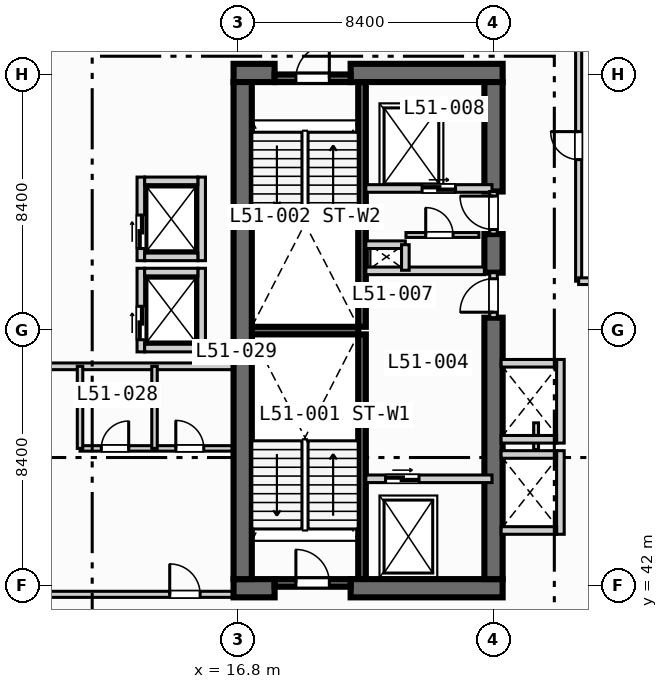
"""IFC4 building model, lengths in metres.
Left out: names, types, materials, properties, quantities, classifications, styles, units other than length and angle.
Written with IfcOpenShell. Run it as: python <this file> out.ifc"""

import sys

from ifc_helpers import new_model, si_unit, direction, frame, frame_2d, origin, place, context, subcontext, project, spatial, rectangle, extrude, element, fill, save


model = new_model("IFC4")
c1 = context("Model", 3, precision=1e-05, world=origin(), true_north=direction((0.0, 1.0)))
c2 = subcontext(c1, "Body", "Model", "MODEL_VIEW")
j1 = project(units=[si_unit("LENGTHUNIT", "METRE"), si_unit("PLANEANGLEUNIT", "RADIAN")], contexts=[c1])
p1 = place(None, origin())
s1 = spatial("IfcSite", under=j1, at=p1, CompositionType="ELEMENT")
p2 = place(p1, origin())
s2 = spatial("IfcBuilding", under=s1, at=p2, CompositionType="ELEMENT")
p3 = place(p2, frame((0.0, 0.0, 208.7)))
s3 = spatial("IfcBuildingStorey", under=s2, at=p3, CompositionType="ELEMENT", Elevation=208.7)
for number, where, z_axis, x_axis in (
    (1, (20.875, 42.2, 0.0), (0.0, 0.0, 1.0), (0.0, 1.0, 0.0)),
    (2, (20.875, 50.5, 0.0), (0.0, 0.0, 1.0), (0.0, 1.0, 0.0)),
):
    element("IfcWall", number, at=place(p3, frame(where, z_axis=z_axis, x_axis=x_axis)), inside=s3, PredefinedType="SOLIDWALL", context=c2, shape_type="SweptSolid", body=[
        extrude(rectangle(XDim=8.05, YDim=0.25, at=frame_2d((4.025, 0.0))), origin(), (0.0, 0.0, 1.0), 3.47),
    ])
p4 = place(p3, frame((17.25, 50.375, 0.0), z_axis=(0.0, 0.0, 1.0), x_axis=(1.0, 0.0, 0.0)))
e3 = element("IfcWall", 3, at=p4, inside=s3, PredefinedType="SOLIDWALL", context=c2, shape_type="SweptSolid", body=[
    extrude(rectangle(XDim=3.5, YDim=0.25, at=frame_2d((1.75, 0.0))), origin(), (0.0, 0.0, 1.0), 3.47),
])
p5 = place(p3, frame((16.65, 41.9, 0.0), z_axis=(0.0, 0.0, 1.0), x_axis=(1.0, 0.0, 0.0)))
e4 = element("IfcWall", 4, at=p5, inside=s3, PredefinedType="SHEAR", context=c2, shape_type="SweptSolid", body=[
    extrude(rectangle(XDim=1.35, YDim=0.6, at=frame_2d((0.675, 0.0))), origin(), (0.0, 0.0, 1.0), 3.47),
])
p6 = place(p3, frame((20.5, 41.9, 0.0), z_axis=(0.0, 0.0, 1.0), x_axis=(1.0, 0.0, 0.0)))
e5 = element("IfcWall", 5, at=p6, inside=s3, PredefinedType="SHEAR", context=c2, shape_type="SweptSolid", body=[
    extrude(rectangle(XDim=5.0, YDim=0.6, at=frame_2d((2.5, 0.0))), origin(), (0.0, 0.0, 1.0), 3.47),
])
p7 = place(p3, frame((16.65, 58.85, 0.0), z_axis=(0.0, 0.0, 1.0), x_axis=(1.0, 0.0, 0.0)))
e6 = element("IfcWall", 6, at=p7, inside=s3, PredefinedType="SHEAR", context=c2, shape_type="SweptSolid", body=[
    extrude(rectangle(XDim=1.35, YDim=0.6, at=frame_2d((0.675, 0.0))), origin(), (0.0, 0.0, 1.0), 3.47),
])
p8 = place(p3, frame((20.5, 58.85, 0.0), z_axis=(0.0, 0.0, 1.0), x_axis=(1.0, 0.0, 0.0)))
e7 = element("IfcWall", 7, at=p8, inside=s3, PredefinedType="SHEAR", context=c2, shape_type="SweptSolid", body=[
    extrude(rectangle(XDim=5.0, YDim=0.6, at=frame_2d((2.5, 0.0))), origin(), (0.0, 0.0, 1.0), 3.47),
])
p9 = place(p3, frame((16.95, 42.2, 0.0), z_axis=(0.0, 0.0, 1.0), x_axis=(0.0, 1.0, 0.0)))
e8 = element("IfcWall", 8, at=p9, inside=s3, PredefinedType="SHEAR", context=c2, shape_type="SweptSolid", body=[
    extrude(rectangle(XDim=16.35, YDim=0.6, at=frame_2d((8.175, 0.0))), origin(), (0.0, 0.0, 1.0), 3.47),
])
p10 = place(p3, frame((25.2, 42.2, 0.0), z_axis=(0.0, 0.0, 1.0), x_axis=(0.0, 1.0, 0.0)))
e9 = element("IfcWall", 9, at=p10, inside=s3, PredefinedType="SHEAR", context=c2, shape_type="SweptSolid", body=[
    extrude(rectangle(XDim=8.6, YDim=0.6, at=frame_2d((4.3, 0.0))), origin(), (0.0, 0.0, 1.0), 3.47),
])
p11 = place(p3, frame((25.2, 52.28, 0.0), z_axis=(0.0, 0.0, 1.0), x_axis=(0.0, 1.0, 0.0)))
e10 = element("IfcWall", 10, at=p11, inside=s3, PredefinedType="SHEAR", context=c2, shape_type="SweptSolid", body=[
    extrude(rectangle(XDim=1.27, YDim=0.6, at=frame_2d((0.635, 0.0))), origin(), (0.0, 0.0, 1.0), 3.47),
])
p12 = place(p3, frame((25.2, 54.95, 0.0), z_axis=(0.0, 0.0, 1.0), x_axis=(0.0, 1.0, 0.0)))
e11 = element("IfcWall", 11, at=p12, inside=s3, PredefinedType="SHEAR", context=c2, shape_type="SweptSolid", body=[
    extrude(rectangle(XDim=3.6, YDim=0.6, at=frame_2d((1.8, 0.0))), origin(), (0.0, 0.0, 1.0), 3.47),
])
p13 = place(p3, frame((18.0, 42.075, 0.0), z_axis=(0.0, 0.0, 1.0), x_axis=(1.0, 0.0, 0.0)))
e12 = element("IfcWall", 12, at=p13, inside=s3, PredefinedType="SOLIDWALL", context=c2, shape_type="SweptSolid", body=[
    extrude(rectangle(XDim=2.5, YDim=0.25, at=frame_2d((1.25, 0.0))), origin(), (0.0, 0.0, 1.0), 3.47),
])
p14 = place(p13, frame((0.7, 0.0, 0.0)))
e13 = element("IfcOpeningElement", 13, at=p14, cuts=e12, PredefinedType="OPENING", context=c2, shape_type="SweptSolid", body=[
    extrude(rectangle(XDim=1.1, YDim=2.15, at=frame_2d((0.55, 1.075))), frame((0.0, 0.135, 0.0), z_axis=(0.0, -1.0, 0.0), x_axis=(1.0, 0.0, 0.0)), (0.0, 0.0, 1.0), 0.27),
])
p15 = place(p3, frame((18.0, 58.675, 0.0), z_axis=(0.0, 0.0, 1.0), x_axis=(1.0, 0.0, 0.0)))
e14 = element("IfcWall", 14, at=p15, inside=s3, PredefinedType="SOLIDWALL", context=c2, shape_type="SweptSolid", body=[
    extrude(rectangle(XDim=2.5, YDim=0.25, at=frame_2d((1.25, 0.0))), origin(), (0.0, 0.0, 1.0), 3.47),
])
p16 = place(p15, frame((0.7, 0.0, 0.0)))
e15 = element("IfcOpeningElement", 15, at=p16, cuts=e14, PredefinedType="OPENING", context=c2, shape_type="SweptSolid", body=[
    extrude(rectangle(XDim=1.1, YDim=2.15, at=frame_2d((0.55, 1.075))), frame((0.0, 0.135, 0.0), z_axis=(0.0, -1.0, 0.0), x_axis=(1.0, 0.0, 0.0)), (0.0, 0.0, 1.0), 0.27),
])
p17 = place(p3, frame((21.0, 45.5, 0.0), z_axis=(0.0, 0.0, 1.0), x_axis=(1.0, 0.0, 0.0)))
e16 = element("IfcWall", 16, at=p17, inside=s3, PredefinedType="SOLIDWALL", context=c2, shape_type="SweptSolid", body=[
    extrude(rectangle(XDim=4.15, YDim=0.25, at=frame_2d((2.075, 0.0))), origin(), (0.0, 0.0, 1.0), 3.47),
])
p18 = place(p17, frame((0.65, 0.0, 0.0)))
e17 = element("IfcOpeningElement", 17, at=p18, cuts=e16, PredefinedType="OPENING", context=c2, shape_type="SweptSolid", body=[
    extrude(rectangle(XDim=1.1, YDim=2.15, at=frame_2d((0.55, 1.075))), frame((0.0, 0.135, 0.0), z_axis=(0.0, -1.0, 0.0), x_axis=(1.0, 0.0, 0.0)), (0.0, 0.0, 1.0), 0.27),
])
p19 = place(p3, frame((25.2, 50.8, 0.0), z_axis=(0.0, 0.0, 1.0), x_axis=(0.0, 1.0, 0.0)))
e18 = element("IfcWall", 18, at=p19, inside=s3, PredefinedType="SOLIDWALL", context=c2, shape_type="SweptSolid", body=[
    extrude(rectangle(XDim=1.48, YDim=0.25, at=frame_2d((0.74, 0.0))), origin(), (0.0, 0.0, 1.0), 3.47),
])
p20 = place(p19, frame((0.18, 0.0, 0.0)))
e19 = element("IfcOpeningElement", 19, at=p20, cuts=e18, PredefinedType="OPENING", context=c2, shape_type="SweptSolid", body=[
    extrude(rectangle(XDim=1.1, YDim=2.15, at=frame_2d((0.55, 1.075))), frame((0.0, 0.135, 0.0), z_axis=(0.0, -1.0, 0.0), x_axis=(1.0, 0.0, 0.0)), (0.0, 0.0, 1.0), 0.27),
])
p21 = place(p3, frame((21.0, 52.34, 0.0), z_axis=(0.0, 0.0, 1.0), x_axis=(1.0, 0.0, 0.0)))
e20 = element("IfcWall", 20, at=p21, inside=s3, PredefinedType="SOLIDWALL", context=c2, shape_type="SweptSolid", body=[
    extrude(rectangle(XDim=3.9, YDim=0.25, at=frame_2d((1.95, 0.0))), origin(), (0.0, 0.0, 1.0), 3.47),
])
p22 = place(p3, frame((21.0, 55.05, 0.0), z_axis=(0.0, 0.0, 1.0), x_axis=(1.0, 0.0, 0.0)))
e21 = element("IfcWall", 21, at=p22, inside=s3, PredefinedType="SOLIDWALL", context=c2, shape_type="SweptSolid", body=[
    extrude(rectangle(XDim=4.15, YDim=0.25, at=frame_2d((2.075, 0.0))), origin(), (0.0, 0.0, 1.0), 3.47),
])
p23 = place(p22, frame((1.85, 0.0, 0.0)))
e22 = element("IfcOpeningElement", 22, at=p23, cuts=e21, PredefinedType="OPENING", context=c2, shape_type="SweptSolid", body=[
    extrude(rectangle(XDim=1.1, YDim=2.15, at=frame_2d((0.55, 1.075))), frame((0.0, 0.135, 0.0), z_axis=(0.0, -1.0, 0.0), x_axis=(1.0, 0.0, 0.0)), (0.0, 0.0, 1.0), 0.27),
])
p24 = place(p3, frame((25.2, 53.55, 0.0), z_axis=(0.0, 0.0, 1.0), x_axis=(0.0, 1.0, 0.0)))
e23 = element("IfcWall", 23, at=p24, inside=s3, PredefinedType="SOLIDWALL", context=c2, shape_type="SweptSolid", body=[
    extrude(rectangle(XDim=1.4, YDim=0.25, at=frame_2d((0.7, 0.0))), origin(), (0.0, 0.0, 1.0), 3.47),
])
p25 = place(p24, frame((0.15, 0.0, 0.0)))
e24 = element("IfcOpeningElement", 24, at=p25, cuts=e23, PredefinedType="OPENING", context=c2, shape_type="SweptSolid", body=[
    extrude(rectangle(XDim=1.1, YDim=2.15, at=frame_2d((0.55, 1.075))), frame((0.0, 0.135, 0.0), z_axis=(0.0, -1.0, 0.0), x_axis=(1.0, 0.0, 0.0)), (0.0, 0.0, 1.0), 0.27),
])
p26 = place(p3, frame((21.0, 53.2, 0.0), z_axis=(0.0, 0.0, 1.0), x_axis=(1.0, 0.0, 0.0)))
e25 = element("IfcWall", 25, at=p26, inside=s3, PredefinedType="SOLIDWALL", context=c2, shape_type="SweptSolid", body=[
    extrude(rectangle(XDim=1.3, YDim=0.25, at=frame_2d((0.65, 0.0))), origin(), (0.0, 0.0, 1.0), 3.47),
])
p27 = place(p3, frame((22.3, 52.36, 0.0), z_axis=(0.0, 0.0, 1.0), x_axis=(0.0, 1.0, 0.0)))
e26 = element("IfcWall", 26, at=p27, inside=s3, PredefinedType="SOLIDWALL", context=c2, shape_type="SweptSolid", body=[
    extrude(rectangle(XDim=0.84, YDim=0.25, at=frame_2d((0.42, 0.0))), origin(), (0.0, 0.0, 1.0), 3.47),
])
p28 = place(p3, frame((22.32, 53.52, 0.0), z_axis=(0.0, 0.0, 1.0), x_axis=(1.0, 0.0, 0.0)))
e27 = element("IfcWall", 27, at=p28, inside=s3, PredefinedType="PARTITIONING", context=c2, shape_type="SweptSolid", body=[
    extrude(rectangle(XDim=2.4, YDim=0.16, at=frame_2d((1.2, 0.0))), origin(), (0.0, 0.0, 1.0), 3.47),
])
p29 = place(p28, frame((0.65, 0.0, 0.0)))
e28 = element("IfcOpeningElement", 28, at=p29, cuts=e27, PredefinedType="OPENING", context=c2, shape_type="SweptSolid", body=[
    extrude(rectangle(XDim=0.9, YDim=2.1, at=frame_2d((0.45, 1.05))), frame((0.0, 0.09, 0.0), z_axis=(0.0, -1.0, 0.0), x_axis=(1.0, 0.0, 0.0)), (0.0, 0.0, 1.0), 0.18),
])
p30 = place(p3, frame((13.6, 49.675, 0.0), z_axis=(0.0, 0.0, 1.0), x_axis=(0.0, 1.0, 0.0)))
e29 = element("IfcWall", 29, at=p30, inside=s3, PredefinedType="SOLIDWALL", context=c2, shape_type="SweptSolid", body=[
    extrude(rectangle(XDim=2.75, YDim=0.25, at=frame_2d((1.375, 0.0))), origin(), (0.0, 0.0, 1.0), 3.47),
])
p31 = place(p30, frame((0.4, 0.0, 0.0)))
e30 = element("IfcOpeningElement", 30, at=p31, cuts=e29, PredefinedType="OPENING", context=c2, shape_type="SweptSolid", body=[
    extrude(rectangle(XDim=1.1, YDim=2.15, at=frame_2d((0.55, 1.075))), frame((0.0, 0.135, 0.0), z_axis=(0.0, -1.0, 0.0), x_axis=(1.0, 0.0, 0.0)), (0.0, 0.0, 1.0), 0.27),
])
p32 = place(p3, frame((15.6, 49.675, 0.0), z_axis=(0.0, 0.0, 1.0), x_axis=(0.0, 1.0, 0.0)))
e31 = element("IfcWall", 31, at=p32, inside=s3, PredefinedType="SOLIDWALL", context=c2, shape_type="SweptSolid", body=[
    extrude(rectangle(XDim=2.75, YDim=0.25, at=frame_2d((1.375, 0.0))), origin(), (0.0, 0.0, 1.0), 3.47),
])
for number, where, z_axis, x_axis in (
    (32, (13.725, 49.8, 0.0), (0.0, 0.0, 1.0), (1.0, 0.0, 0.0)),
    (33, (13.725, 52.3, 0.0), (0.0, 0.0, 1.0), (1.0, 0.0, 0.0)),
):
    element("IfcWall", number, at=place(p3, frame(where, z_axis=z_axis, x_axis=x_axis)), inside=s3, PredefinedType="SOLIDWALL", context=c2, shape_type="SweptSolid", body=[
        extrude(rectangle(XDim=1.75, YDim=0.25, at=frame_2d((0.875, 0.0))), origin(), (0.0, 0.0, 1.0), 3.47),
    ])
p33 = place(p3, frame((13.6, 52.675, 0.0), z_axis=(0.0, 0.0, 1.0), x_axis=(0.0, 1.0, 0.0)))
e34 = element("IfcWall", 34, at=p33, inside=s3, PredefinedType="SOLIDWALL", context=c2, shape_type="SweptSolid", body=[
    extrude(rectangle(XDim=2.75, YDim=0.25, at=frame_2d((1.375, 0.0))), origin(), (0.0, 0.0, 1.0), 3.47),
])
p34 = place(p33, frame((0.4, 0.0, 0.0)))
e35 = element("IfcOpeningElement", 35, at=p34, cuts=e34, PredefinedType="OPENING", context=c2, shape_type="SweptSolid", body=[
    extrude(rectangle(XDim=1.1, YDim=2.15, at=frame_2d((0.55, 1.075))), frame((0.0, 0.135, 0.0), z_axis=(0.0, -1.0, 0.0), x_axis=(1.0, 0.0, 0.0)), (0.0, 0.0, 1.0), 0.27),
])
p35 = place(p3, frame((15.6, 52.675, 0.0), z_axis=(0.0, 0.0, 1.0), x_axis=(0.0, 1.0, 0.0)))
e36 = element("IfcWall", 36, at=p35, inside=s3, PredefinedType="SOLIDWALL", context=c2, shape_type="SweptSolid", body=[
    extrude(rectangle(XDim=2.75, YDim=0.25, at=frame_2d((1.375, 0.0))), origin(), (0.0, 0.0, 1.0), 3.47),
])
for number, where, z_axis, x_axis in (
    (37, (13.725, 52.8, 0.0), (0.0, 0.0, 1.0), (1.0, 0.0, 0.0)),
    (38, (13.725, 55.3, 0.0), (0.0, 0.0, 1.0), (1.0, 0.0, 0.0)),
):
    element("IfcWall", number, at=place(p3, frame(where, z_axis=z_axis, x_axis=x_axis)), inside=s3, PredefinedType="SOLIDWALL", context=c2, shape_type="SweptSolid", body=[
        extrude(rectangle(XDim=1.75, YDim=0.25, at=frame_2d((0.875, 0.0))), origin(), (0.0, 0.0, 1.0), 3.47),
    ])
p36 = place(p3, frame((27.4, 43.675, 0.0), z_axis=(0.0, 0.0, 1.0), x_axis=(0.0, 1.0, 0.0)))
e39 = element("IfcWall", 39, at=p36, inside=s3, PredefinedType="SOLIDWALL", context=c2, shape_type="SweptSolid", body=[
    extrude(rectangle(XDim=2.75, YDim=0.25, at=frame_2d((1.375, 0.0))), origin(), (0.0, 0.0, 1.0), 3.47),
])
for number, where, z_axis, x_axis in (
    (40, (25.45, 43.8, 0.0), (0.0, 0.0, 1.0), (1.0, 0.0, 0.0)),
    (41, (25.45, 46.3, 0.0), (0.0, 0.0, 1.0), (1.0, 0.0, 0.0)),
):
    element("IfcWall", number, at=place(p3, frame(where, z_axis=z_axis, x_axis=x_axis)), inside=s3, PredefinedType="SOLIDWALL", context=c2, shape_type="SweptSolid", body=[
        extrude(rectangle(XDim=1.825, YDim=0.25, at=frame_2d((0.913, 0.0))), origin(), (0.0, 0.0, 1.0), 3.47),
    ])
p37 = place(p3, frame((26.6, 46.46, 0.0), z_axis=(0.0, 0.0, 1.0), x_axis=(0.0, 1.0, 0.0)))
e42 = element("IfcWall", 42, at=p37, inside=s3, PredefinedType="PARTITIONING", context=c2, shape_type="SweptSolid", body=[
    extrude(rectangle(XDim=0.88, YDim=0.16, at=frame_2d((0.44, 0.0))), origin(), (0.0, 0.0, 1.0), 3.47),
])
p38 = place(p3, frame((27.4, 46.675, 0.0), z_axis=(0.0, 0.0, 1.0), x_axis=(0.0, 1.0, 0.0)))
e43 = element("IfcWall", 43, at=p38, inside=s3, PredefinedType="SOLIDWALL", context=c2, shape_type="SweptSolid", body=[
    extrude(rectangle(XDim=2.75, YDim=0.25, at=frame_2d((1.375, 0.0))), origin(), (0.0, 0.0, 1.0), 3.47),
])
for number, where, z_axis, x_axis in (
    (44, (25.45, 46.8, 0.0), (0.0, 0.0, 1.0), (1.0, 0.0, 0.0)),
    (45, (25.45, 49.3, 0.0), (0.0, 0.0, 1.0), (1.0, 0.0, 0.0)),
):
    element("IfcWall", number, at=place(p3, frame(where, z_axis=z_axis, x_axis=x_axis)), inside=s3, PredefinedType="SOLIDWALL", context=c2, shape_type="SweptSolid", body=[
        extrude(rectangle(XDim=1.825, YDim=0.25, at=frame_2d((0.913, 0.0))), origin(), (0.0, 0.0, 1.0), 3.47),
    ])
p39 = place(p3, frame((0.35, 41.7, 0.0), z_axis=(0.0, 0.0, 1.0), x_axis=(1.0, 0.0, 0.0)))
e46 = element("IfcWall", 46, at=p39, inside=s3, PredefinedType="PARTITIONING", context=c2, shape_type="SweptSolid", body=[
    extrude(rectangle(XDim=16.25, YDim=0.2, at=frame_2d((8.125, 0.0))), origin(), (0.0, 0.0, 1.0), 2.82),
])
p40 = place(p39, frame((14.2, 0.0, 0.0)))
e47 = element("IfcOpeningElement", 47, at=p40, cuts=e46, PredefinedType="OPENING", context=c2, shape_type="SweptSolid", body=[
    extrude(rectangle(XDim=1.0, YDim=2.15, at=frame_2d((0.5, 1.075))), frame((0.0, 0.11, 0.0), z_axis=(0.0, -1.0, 0.0), x_axis=(1.0, 0.0, 0.0)), (0.0, 0.0, 1.0), 0.22),
])
p41 = place(p3, frame((0.35, 49.2, 0.0), z_axis=(0.0, 0.0, 1.0), x_axis=(1.0, 0.0, 0.0)))
e48 = element("IfcWall", 48, at=p41, inside=s3, PredefinedType="PARTITIONING", context=c2, shape_type="SweptSolid", body=[
    extrude(rectangle(XDim=16.25, YDim=0.22, at=frame_2d((8.125, 0.0))), origin(), (0.0, 0.0, 1.0), 3.47),
])
p42 = place(p3, frame((11.6, 46.5, 0.0), z_axis=(0.0, 0.0, 1.0), x_axis=(1.0, 0.0, 0.0)))
e49 = element("IfcWall", 49, at=p42, inside=s3, PredefinedType="PLUMBINGWALL", context=c2, shape_type="SweptSolid", body=[
    extrude(rectangle(XDim=5.0, YDim=0.18, at=frame_2d((2.5, 0.0))), origin(), (0.0, 0.0, 1.0), 3.47),
])
p43 = place(p42, frame((0.7, 0.0, 0.0)))
e50 = element("IfcOpeningElement", 50, at=p43, cuts=e49, PredefinedType="OPENING", context=c2, shape_type="SweptSolid", body=[
    extrude(rectangle(XDim=0.9, YDim=2.1, at=frame_2d((0.45, 1.05))), frame((0.0, 0.1, 0.0), z_axis=(0.0, -1.0, 0.0), x_axis=(1.0, 0.0, 0.0)), (0.0, 0.0, 1.0), 0.2),
])
p44 = place(p42, frame((3.15, 0.0, 0.0)))
e51 = element("IfcOpeningElement", 51, at=p44, cuts=e49, PredefinedType="OPENING", context=c2, shape_type="SweptSolid", body=[
    extrude(rectangle(XDim=0.92, YDim=2.1, at=frame_2d((0.46, 1.05))), frame((0.0, 0.1, 0.0), z_axis=(0.0, -1.0, 0.0), x_axis=(1.0, 0.0, 0.0)), (0.0, 0.0, 1.0), 0.2),
])
for number, where, z_axis, x_axis in (
    (52, (11.6, 46.5, 0.0), (0.0, 0.0, 1.0), (0.0, 1.0, 0.0)),
    (53, (14.05, 46.5, 0.0), (0.0, 0.0, 1.0), (0.0, 1.0, 0.0)),
):
    element("IfcWall", number, at=place(p3, frame(where, z_axis=z_axis, x_axis=x_axis)), inside=s3, PredefinedType="PLUMBINGWALL", context=c2, shape_type="SweptSolid", body=[
        extrude(rectangle(XDim=2.7, YDim=0.18, at=frame_2d((1.35, 0.0))), origin(), (0.0, 0.0, 1.0), 3.47),
    ])
p45 = place(p3, frame((28.0, 52.0, 0.0), z_axis=(0.0, 0.0, 1.0), x_axis=(0.0, 1.0, 0.0)))
e54 = element("IfcWall", 54, at=p45, inside=s3, PredefinedType="PARTITIONING", context=c2, shape_type="SweptSolid", body=[
    extrude(rectangle(XDim=20.2, YDim=0.2, at=frame_2d((10.1, 0.0))), origin(), (0.0, 0.0, 1.0), 3.47),
])
p46 = place(p45, frame((4.0, 0.0, 0.0)))
e55 = element("IfcOpeningElement", 55, at=p46, cuts=e54, PredefinedType="OPENING", context=c2, shape_type="SweptSolid", body=[
    extrude(rectangle(XDim=0.92, YDim=2.1, at=frame_2d((0.46, 1.05))), frame((0.0, 0.11, 0.0), z_axis=(0.0, -1.0, 0.0), x_axis=(1.0, 0.0, 0.0)), (0.0, 0.0, 1.0), 0.22),
])
p47 = place(p3, frame((28.0, 52.0, 0.0), z_axis=(0.0, 0.0, 1.0), x_axis=(1.0, 0.0, 0.0)))
e56 = element("IfcWall", 56, at=p47, inside=s3, PredefinedType="PARTITIONING", context=c2, shape_type="SweptSolid", body=[
    extrude(rectangle(XDim=5.3, YDim=0.22, at=frame_2d((2.65, 0.0))), origin(), (0.0, 0.0, 1.0), 3.47),
])
p48 = place(p14, origin())
e57 = element("IfcDoor", 57, at=p48, inside=s3, OperationType="SINGLE_SWING_LEFT", PredefinedType="DOOR", context=c2, shape_type="SweptSolid", body=[
    extrude(rectangle(XDim=1.1, YDim=2.15, at=frame_2d((0.55, 1.075))), frame((0.0, 0.025, 0.0), z_axis=(0.0, -1.0, 0.0), x_axis=(1.0, 0.0, 0.0)), (0.0, 0.0, 1.0), 0.05),
])
fill(e13, e57)
p49 = place(p16, origin())
e58 = element("IfcDoor", 58, at=p49, inside=s3, OperationType="SINGLE_SWING_RIGHT", PredefinedType="DOOR", context=c2, shape_type="SweptSolid", body=[
    extrude(rectangle(XDim=1.1, YDim=2.15, at=frame_2d((0.55, 1.075))), frame((0.0, 0.025, 0.0), z_axis=(0.0, -1.0, 0.0), x_axis=(1.0, 0.0, 0.0)), (0.0, 0.0, 1.0), 0.05),
])
fill(e15, e58)
p50 = place(p18, origin())
e59 = element("IfcDoor", 59, at=p50, inside=s3, OperationType="SLIDING_TO_LEFT", PredefinedType="DOOR", context=c2, shape_type="SweptSolid", body=[
    extrude(rectangle(XDim=1.1, YDim=2.15, at=frame_2d((0.55, 1.075))), frame((0.0, 0.025, 0.0), z_axis=(0.0, -1.0, 0.0), x_axis=(1.0, 0.0, 0.0)), (0.0, 0.0, 1.0), 0.05),
])
fill(e17, e59)
p51 = place(p20, origin())
e60 = element("IfcDoor", 60, at=p51, inside=s3, OperationType="SINGLE_SWING_LEFT", PredefinedType="DOOR", context=c2, shape_type="SweptSolid", body=[
    extrude(rectangle(XDim=1.1, YDim=2.15, at=frame_2d((0.55, 1.075))), frame((0.0, 0.025, 0.0), z_axis=(0.0, -1.0, 0.0), x_axis=(1.0, 0.0, 0.0)), (0.0, 0.0, 1.0), 0.05),
])
fill(e19, e60)
p52 = place(p23, origin())
e61 = element("IfcDoor", 61, at=p52, inside=s3, OperationType="SLIDING_TO_LEFT", PredefinedType="DOOR", context=c2, shape_type="SweptSolid", body=[
    extrude(rectangle(XDim=1.1, YDim=2.15, at=frame_2d((0.55, 1.075))), frame((0.0, 0.025, 0.0), z_axis=(0.0, -1.0, 0.0), x_axis=(1.0, 0.0, 0.0)), (0.0, 0.0, 1.0), 0.05),
])
fill(e22, e61)
p53 = place(p25, origin())
e62 = element("IfcDoor", 62, at=p53, inside=s3, OperationType="SINGLE_SWING_RIGHT", PredefinedType="DOOR", context=c2, shape_type="SweptSolid", body=[
    extrude(rectangle(XDim=1.1, YDim=2.15, at=frame_2d((0.55, 1.075))), frame((0.0, 0.025, 0.0), z_axis=(0.0, -1.0, 0.0), x_axis=(1.0, 0.0, 0.0)), (0.0, 0.0, 1.0), 0.05),
])
fill(e24, e62)
p54 = place(p29, origin())
e63 = element("IfcDoor", 63, at=p54, inside=s3, OperationType="SINGLE_SWING_LEFT", PredefinedType="DOOR", context=c2, shape_type="SweptSolid", body=[
    extrude(rectangle(XDim=0.9, YDim=2.1, at=frame_2d((0.45, 1.05))), frame((0.0, 0.025, 0.0), z_axis=(0.0, -1.0, 0.0), x_axis=(1.0, 0.0, 0.0)), (0.0, 0.0, 1.0), 0.05),
])
fill(e28, e63)
p55 = place(p31, origin())
e64 = element("IfcDoor", 64, at=p55, inside=s3, OperationType="SLIDING_TO_LEFT", PredefinedType="DOOR", context=c2, shape_type="SweptSolid", body=[
    extrude(rectangle(XDim=1.1, YDim=2.15, at=frame_2d((0.55, 1.075))), frame((0.0, 0.025, 0.0), z_axis=(0.0, -1.0, 0.0), x_axis=(1.0, 0.0, 0.0)), (0.0, 0.0, 1.0), 0.05),
])
fill(e30, e64)
p56 = place(p34, origin())
e65 = element("IfcDoor", 65, at=p56, inside=s3, OperationType="SLIDING_TO_LEFT", PredefinedType="DOOR", context=c2, shape_type="SweptSolid", body=[
    extrude(rectangle(XDim=1.1, YDim=2.15, at=frame_2d((0.55, 1.075))), frame((0.0, 0.025, 0.0), z_axis=(0.0, -1.0, 0.0), x_axis=(1.0, 0.0, 0.0)), (0.0, 0.0, 1.0), 0.05),
])
fill(e35, e65)
p57 = place(p40, origin())
e66 = element("IfcDoor", 66, at=p57, inside=s3, OperationType="SINGLE_SWING_LEFT", PredefinedType="DOOR", context=c2, shape_type="SweptSolid", body=[
    extrude(rectangle(XDim=1.0, YDim=2.15, at=frame_2d((0.5, 1.075))), frame((0.0, 0.025, 0.0), z_axis=(0.0, -1.0, 0.0), x_axis=(1.0, 0.0, 0.0)), (0.0, 0.0, 1.0), 0.05),
])
fill(e47, e66)
p58 = place(p43, origin())
e67 = element("IfcDoor", 67, at=p58, inside=s3, OperationType="SINGLE_SWING_RIGHT", PredefinedType="DOOR", context=c2, shape_type="SweptSolid", body=[
    extrude(rectangle(XDim=0.9, YDim=2.1, at=frame_2d((0.45, 1.05))), frame((0.0, 0.025, 0.0), z_axis=(0.0, -1.0, 0.0), x_axis=(1.0, 0.0, 0.0)), (0.0, 0.0, 1.0), 0.05),
])
fill(e50, e67)
p59 = place(p44, origin())
e68 = element("IfcDoor", 68, at=p59, inside=s3, OperationType="SINGLE_SWING_LEFT", PredefinedType="DOOR", context=c2, shape_type="SweptSolid", body=[
    extrude(rectangle(XDim=0.92, YDim=2.1, at=frame_2d((0.46, 1.05))), frame((0.0, 0.025, 0.0), z_axis=(0.0, -1.0, 0.0), x_axis=(1.0, 0.0, 0.0)), (0.0, 0.0, 1.0), 0.05),
])
fill(e51, e68)
p60 = place(p46, origin())
e69 = element("IfcDoor", 69, at=p60, inside=s3, OperationType="SINGLE_SWING_RIGHT", PredefinedType="DOOR", context=c2, shape_type="SweptSolid", body=[
    extrude(rectangle(XDim=0.92, YDim=2.1, at=frame_2d((0.46, 1.05))), frame((0.0, 0.025, 0.0), z_axis=(0.0, -1.0, 0.0), x_axis=(1.0, 0.0, 0.0)), (0.0, 0.0, 1.0), 0.05),
])
fill(e55, e69)
save(model, sys.argv[1])
